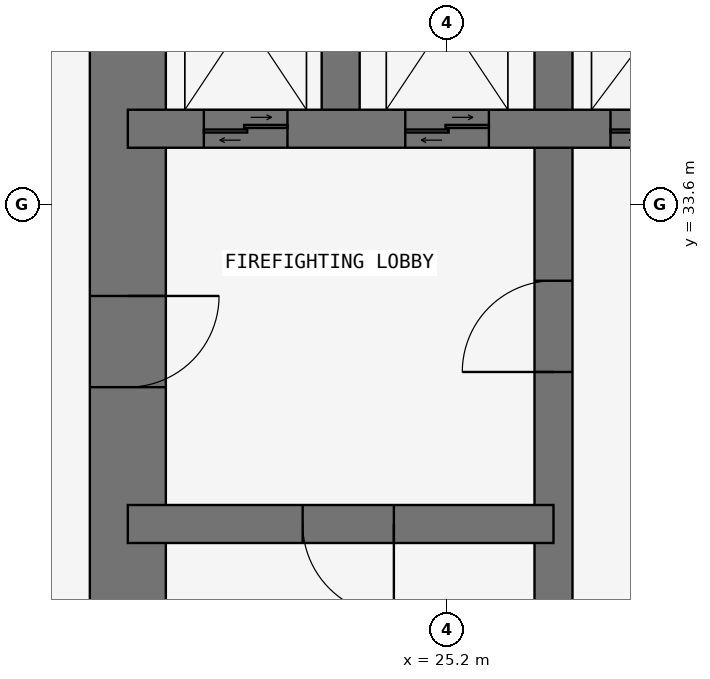
"""IFC4 building model, lengths in metres.
Left out: names, types, materials, properties, quantities, classifications, styles, units other than length and angle.
Written with IfcOpenShell. Run it as: python <this file> out.ifc"""

import sys

from ifc_helpers import new_model, si_unit, direction, frame, frame_2d, origin, place, context, subcontext, project, spatial, rectangle, extrude, element, fill, save


model = new_model("IFC4")
c1 = context("Model", 3, precision=1e-05, world=origin(), true_north=direction((0.0, 1.0)))
c2 = subcontext(c1, "Body", "Model", "MODEL_VIEW")
j1 = project(units=[si_unit("LENGTHUNIT", "METRE"), si_unit("PLANEANGLEUNIT", "RADIAN")], contexts=[c1])
p1 = place(None, origin())
s1 = spatial("IfcSite", under=j1, at=p1, CompositionType="ELEMENT")
p2 = place(p1, origin())
s2 = spatial("IfcBuilding", under=s1, at=p2, CompositionType="ELEMENT")
p3 = place(p2, frame((0.0, 0.0, 66.9)))
s3 = spatial("IfcBuildingStorey", under=s2, at=p3, CompositionType="ELEMENT", Elevation=66.9)
p4 = place(p3, frame((21.0, 37.8, 0.0), z_axis=(0.0, 0.0, 1.0), x_axis=(0.0, -1.0, 0.0)))
e1 = element("IfcWall", 1, at=p4, inside=s3, PredefinedType="SHEAR", context=c2, shape_type="SweptSolid", body=[
    extrude(rectangle(XDim=17.3, YDim=1.0, at=frame_2d((8.65, 0.0))), origin(), (0.0, 0.0, 1.0), 3.6),
])
p5 = place(p4, frame((5.4, 0.0, 0.0)))
e2 = element("IfcOpeningElement", 2, at=p5, cuts=e1, PredefinedType="OPENING", context=c2, shape_type="SweptSolid", body=[
    extrude(rectangle(XDim=1.2, YDim=2.1, at=frame_2d((0.6, 1.05))), frame((0.0, 0.51, 0.0), z_axis=(0.0, -1.0, 0.0), x_axis=(1.0, 0.0, 0.0)), (0.0, 0.0, 1.0), 1.02),
])
p6 = place(p3, frame((26.6, 21.0, 0.0), z_axis=(0.0, 0.0, 1.0), x_axis=(0.0, 1.0, 0.0)))
e3 = element("IfcWall", 3, at=p6, inside=s3, PredefinedType="SHEAR", context=c2, shape_type="SweptSolid", body=[
    extrude(rectangle(XDim=16.8, YDim=0.5, at=frame_2d((8.4, 0.0))), origin(), (0.0, 0.0, 1.0), 3.6),
])
p7 = place(p6, frame((10.4, 0.0, 0.0)))
e4 = element("IfcOpeningElement", 4, at=p7, cuts=e3, PredefinedType="OPENING", context=c2, shape_type="SweptSolid", body=[
    extrude(rectangle(XDim=1.2, YDim=2.1, at=frame_2d((0.6, 1.05))), frame((0.0, 0.26, 0.0), z_axis=(0.0, -1.0, 0.0), x_axis=(1.0, 0.0, 0.0)), (0.0, 0.0, 1.0), 0.52),
])
p8 = place(p3, frame((21.0, 29.4, 0.0), z_axis=(0.0, 0.0, 1.0), x_axis=(1.0, 0.0, 0.0)))
e5 = element("IfcWall", 5, at=p8, inside=s3, PredefinedType="SHEAR", context=c2, shape_type="SweptSolid", body=[
    extrude(rectangle(XDim=5.6, YDim=0.5, at=frame_2d((2.8, 0.0))), origin(), (0.0, 0.0, 1.0), 3.6),
])
p9 = place(p8, frame((2.3, 0.0, 0.0)))
e6 = element("IfcOpeningElement", 6, at=p9, cuts=e5, PredefinedType="OPENING", context=c2, shape_type="SweptSolid", body=[
    extrude(rectangle(XDim=1.2, YDim=2.1, at=frame_2d((0.6, 1.05))), frame((0.0, 0.26, 0.0), z_axis=(0.0, -1.0, 0.0), x_axis=(1.0, 0.0, 0.0)), (0.0, 0.0, 1.0), 0.52),
])
p10 = place(p3, frame((21.0, 34.6, 0.0), z_axis=(0.0, 0.0, 1.0), x_axis=(1.0, 0.0, 0.0)))
e7 = element("IfcWall", 7, at=p10, inside=s3, PredefinedType="SHEAR", context=c2, shape_type="SweptSolid", body=[
    extrude(rectangle(XDim=11.2, YDim=0.5, at=frame_2d((5.6, 0.0))), origin(), (0.0, 0.0, 1.0), 3.6),
])
p11 = place(p10, frame((9.35, 0.0, 0.0)))
e8 = element("IfcOpeningElement", 8, at=p11, cuts=e7, PredefinedType="OPENING", context=c2, shape_type="SweptSolid", body=[
    extrude(rectangle(XDim=0.9, YDim=2.1, at=frame_2d((0.45, 1.05))), frame((0.0, 0.26, 0.0), z_axis=(0.0, -1.0, 0.0), x_axis=(1.0, 0.0, 0.0)), (0.0, 0.0, 1.0), 0.52),
])
p12 = place(p10, frame((1.0, 0.0, 0.0)))
e9 = element("IfcOpeningElement", 9, at=p12, cuts=e7, PredefinedType="OPENING", context=c2, shape_type="SweptSolid", body=[
    extrude(rectangle(XDim=1.1, YDim=2.1, at=frame_2d((0.55, 1.05))), frame((0.0, 0.26, 0.0), z_axis=(0.0, -1.0, 0.0), x_axis=(1.0, 0.0, 0.0)), (0.0, 0.0, 1.0), 0.52),
])
p13 = place(p10, frame((3.65, 0.0, 0.0)))
e10 = element("IfcOpeningElement", 10, at=p13, cuts=e7, PredefinedType="OPENING", context=c2, shape_type="SweptSolid", body=[
    extrude(rectangle(XDim=1.1, YDim=2.1, at=frame_2d((0.55, 1.05))), frame((0.0, 0.26, 0.0), z_axis=(0.0, -1.0, 0.0), x_axis=(1.0, 0.0, 0.0)), (0.0, 0.0, 1.0), 0.52),
])
p14 = place(p10, frame((6.35, 0.0, 0.0)))
e11 = element("IfcOpeningElement", 11, at=p14, cuts=e7, PredefinedType="OPENING", context=c2, shape_type="SweptSolid", body=[
    extrude(rectangle(XDim=1.3, YDim=2.1, at=frame_2d((0.65, 1.05))), frame((0.0, 0.26, 0.0), z_axis=(0.0, -1.0, 0.0), x_axis=(1.0, 0.0, 0.0)), (0.0, 0.0, 1.0), 0.52),
])
p15 = place(p3, frame((23.8, 34.6, 0.0), z_axis=(0.0, 0.0, 1.0), x_axis=(0.0, 1.0, 0.0)))
e12 = element("IfcWall", 12, at=p15, inside=s3, PredefinedType="SHEAR", context=c2, shape_type="SweptSolid", body=[
    extrude(rectangle(XDim=3.2, YDim=0.5, at=frame_2d((1.6, 0.0))), origin(), (0.0, 0.0, 1.0), 3.6),
])
p16 = place(p5, origin())
e13 = element("IfcDoor", 13, at=p16, inside=s3, OperationType="SINGLE_SWING_LEFT", PredefinedType="DOOR", context=c2, shape_type="SweptSolid", body=[
    extrude(rectangle(XDim=1.2, YDim=2.1, at=frame_2d((0.6, 1.05))), frame((0.0, 0.025, 0.0), z_axis=(0.0, -1.0, 0.0), x_axis=(1.0, 0.0, 0.0)), (0.0, 0.0, 1.0), 0.05),
])
fill(e2, e13)
p17 = place(p9, frame((1.2, 0.0, 0.0), z_axis=(0.0, 0.0, 1.0), x_axis=(-1.0, 0.0, 0.0)))
e14 = element("IfcDoor", 14, at=p17, inside=s3, OperationType="SINGLE_SWING_LEFT", PredefinedType="DOOR", context=c2, shape_type="SweptSolid", body=[
    extrude(rectangle(XDim=1.2, YDim=2.1, at=frame_2d((0.6, 1.05))), frame((0.0, 0.025, 0.0), z_axis=(0.0, -1.0, 0.0), x_axis=(1.0, 0.0, 0.0)), (0.0, 0.0, 1.0), 0.05),
])
fill(e6, e14)
p18 = place(p7, origin())
e15 = element("IfcDoor", 15, at=p18, inside=s3, OperationType="SINGLE_SWING_LEFT", PredefinedType="DOOR", context=c2, shape_type="SweptSolid", body=[
    extrude(rectangle(XDim=1.2, YDim=2.1, at=frame_2d((0.6, 1.05))), frame((0.0, 0.025, 0.0), z_axis=(0.0, -1.0, 0.0), x_axis=(1.0, 0.0, 0.0)), (0.0, 0.0, 1.0), 0.05),
])
fill(e4, e15)
p19 = place(p12, origin())
e16 = element("IfcDoor", 16, at=p19, inside=s3, OperationType="DOUBLE_DOOR_SLIDING", PredefinedType="DOOR", context=c2, shape_type="SweptSolid", body=[
    extrude(rectangle(XDim=1.1, YDim=2.1, at=frame_2d((0.55, 1.05))), frame((0.0, 0.025, 0.0), z_axis=(0.0, -1.0, 0.0), x_axis=(1.0, 0.0, 0.0)), (0.0, 0.0, 1.0), 0.05),
])
fill(e9, e16)
p20 = place(p13, origin())
e17 = element("IfcDoor", 17, at=p20, inside=s3, OperationType="DOUBLE_DOOR_SLIDING", PredefinedType="DOOR", context=c2, shape_type="SweptSolid", body=[
    extrude(rectangle(XDim=1.1, YDim=2.1, at=frame_2d((0.55, 1.05))), frame((0.0, 0.025, 0.0), z_axis=(0.0, -1.0, 0.0), x_axis=(1.0, 0.0, 0.0)), (0.0, 0.0, 1.0), 0.05),
])
fill(e10, e17)
p21 = place(p14, origin())
e18 = element("IfcDoor", 18, at=p21, inside=s3, OperationType="DOUBLE_DOOR_SLIDING", PredefinedType="DOOR", context=c2, shape_type="SweptSolid", body=[
    extrude(rectangle(XDim=1.3, YDim=2.1, at=frame_2d((0.65, 1.05))), frame((0.0, 0.025, 0.0), z_axis=(0.0, -1.0, 0.0), x_axis=(1.0, 0.0, 0.0)), (0.0, 0.0, 1.0), 0.05),
])
fill(e11, e18)
save(model, sys.argv[1])
